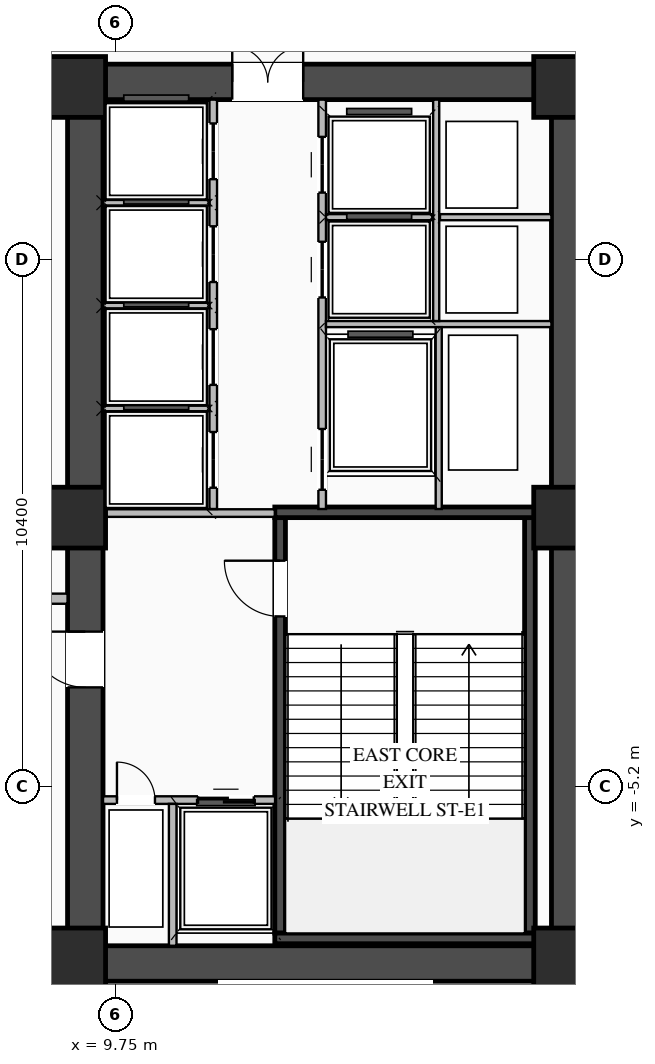
"""IFC4 building model, lengths in metres.
Left out: names, types, materials, properties, quantities, classifications, styles, units other than length and angle.
Written with IfcOpenShell. Run it as: python <this file> out.ifc"""

import sys

from ifc_helpers import new_model, si_unit, direction, frame, frame_2d, origin, origin_2d, place, context, subcontext, project, spatial, rectangle, extrude, element, fill, save


model = new_model("IFC4")
c1 = context("Model", 3, precision=1e-05, world=origin(), true_north=direction((0.0, 1.0)))
c2 = subcontext(c1, "Body", "Model", "MODEL_VIEW")
j1 = project(units=[si_unit("LENGTHUNIT", "METRE"), si_unit("PLANEANGLEUNIT", "RADIAN")], contexts=[c1])
p1 = place(None, origin())
s1 = spatial("IfcSite", under=j1, at=p1, CompositionType="ELEMENT")
p2 = place(p1, origin())
s2 = spatial("IfcBuilding", under=s1, at=p2, CompositionType="ELEMENT")
p3 = place(p2, origin())
s3 = spatial("IfcBuildingStorey", under=s2, at=p3, CompositionType="ELEMENT", Elevation=0.0)
p4 = place(p3, frame((8.8, -8.7, 0.0), z_axis=(0.0, 0.0, 1.0), x_axis=(1.0, 0.0, 0.0)))
e1 = element("IfcWall", 1, at=p4, inside=s3, PredefinedType="SHEAR", context=c2, shape_type="SweptSolid", body=[
    extrude(rectangle(XDim=10.25, YDim=0.7, at=frame_2d((5.125, 0.0))), origin(), (0.0, 0.0, 1.0), 4.85),
])
p5 = place(p3, frame((8.8, 8.7, 0.0), z_axis=(0.0, 0.0, 1.0), x_axis=(1.0, 0.0, 0.0)))
e2 = element("IfcWall", 2, at=p5, inside=s3, PredefinedType="SHEAR", context=c2, shape_type="SweptSolid", body=[
    extrude(rectangle(XDim=10.25, YDim=0.7, at=frame_2d((5.125, 0.0))), origin(), (0.0, 0.0, 1.0), 4.85),
])
p6 = place(p5, frame((3.25, 0.0, 0.0)))
e3 = element("IfcOpeningElement", 3, at=p6, cuts=e2, PredefinedType="OPENING", context=c2, shape_type="SweptSolid", body=[
    extrude(rectangle(XDim=1.4, YDim=2.05, at=frame_2d((0.7, 1.025))), frame((0.0, 0.36, 0.0), z_axis=(0.0, -1.0, 0.0), x_axis=(1.0, 0.0, 0.0)), (0.0, 0.0, 1.0), 0.72),
])
p7 = place(p3, frame((9.15, -8.35, 0.0), z_axis=(0.0, 0.0, 1.0), x_axis=(0.0, 1.0, 0.0)))
e4 = element("IfcWall", 4, at=p7, inside=s3, PredefinedType="SHEAR", context=c2, shape_type="SweptSolid", body=[
    extrude(rectangle(XDim=16.7, YDim=0.7, at=frame_2d((8.35, 0.0))), origin(), (0.0, 0.0, 1.0), 4.85),
])
p8 = place(p7, frame((5.1, 0.0, 0.0)))
e5 = element("IfcOpeningElement", 5, at=p8, cuts=e4, PredefinedType="OPENING", context=c2, shape_type="SweptSolid", body=[
    extrude(rectangle(XDim=1.1, YDim=2.08, at=frame_2d((0.55, 1.04))), frame((0.0, 0.36, 0.0), z_axis=(0.0, -1.0, 0.0), x_axis=(1.0, 0.0, 0.0)), (0.0, 0.0, 1.0), 0.72),
])
p9 = place(p3, frame((18.7, -8.35, 0.0), z_axis=(0.0, 0.0, 1.0), x_axis=(0.0, 1.0, 0.0)))
e6 = element("IfcWall", 6, at=p9, inside=s3, PredefinedType="SHEAR", context=c2, shape_type="SweptSolid", body=[
    extrude(rectangle(XDim=16.7, YDim=0.7, at=frame_2d((8.35, 0.0))), origin(), (0.0, 0.0, 1.0), 4.85),
])
p10 = place(p3, frame((12.995, -8.1, 0.0), z_axis=(0.0, 0.0, 1.0), x_axis=(0.0, 1.0, 0.0)))
e7 = element("IfcWall", 7, at=p10, inside=s3, PredefinedType="SHEAR", context=c2, shape_type="SweptSolid", body=[
    extrude(rectangle(XDim=8.2, YDim=0.21, at=frame_2d((4.1, 0.0))), origin(), (0.0, 0.0, 1.0), 4.85),
])
p11 = place(p10, frame((6.25, 0.0, 0.0)))
e8 = element("IfcOpeningElement", 8, at=p11, cuts=e7, PredefinedType="OPENING", context=c2, shape_type="SweptSolid", body=[
    extrude(rectangle(XDim=1.1, YDim=2.15, at=frame_2d((0.55, 1.075))), frame((0.0, 0.115, 0.0), z_axis=(0.0, -1.0, 0.0), x_axis=(1.0, 0.0, 0.0)), (0.0, 0.0, 1.0), 0.23),
])
p12 = place(p3, frame((17.925, -8.1, 0.0), z_axis=(0.0, 0.0, 1.0), x_axis=(0.0, 1.0, 0.0)))
e9 = element("IfcWall", 9, at=p12, inside=s3, PredefinedType="SHEAR", context=c2, shape_type="SweptSolid", body=[
    extrude(rectangle(XDim=8.2, YDim=0.21, at=frame_2d((4.1, 0.0))), origin(), (0.0, 0.0, 1.0), 4.85),
])
for number, where, z_axis, x_axis in (
    (10, (12.89, -8.205, 0.0), (0.0, 0.0, 1.0), (1.0, 0.0, 0.0)),
    (11, (18.03, 0.205, 0.0), (0.0, 0.0, 1.0), (-1.0, 0.0, 0.0)),
):
    element("IfcWall", number, at=place(p3, frame(where, z_axis=z_axis, x_axis=x_axis)), inside=s3, PredefinedType="SHEAR", context=c2, shape_type="SweptSolid", body=[
        extrude(rectangle(XDim=5.14, YDim=0.21, at=frame_2d((2.57, 0.0))), origin(), (0.0, 0.0, 1.0), 4.85),
    ])
for number, where, z_axis, x_axis in (
    (12, (8.95, -8.6, 0.0), (0.0, 0.0, 1.0), (1.0, 0.0, 0.0)),
    (13, (8.95, 0.1, 0.0), (0.0, 0.0, 1.0), (1.0, 0.0, 0.0)),
    (14, (8.95, 8.6, 0.0), (0.0, 0.0, 1.0), (1.0, 0.0, 0.0)),
    (15, (18.6, -8.6, 0.0), (0.0, 0.0, 1.0), (1.0, 0.0, 0.0)),
    (16, (18.6, 0.1, 0.0), (0.0, 0.0, 1.0), (1.0, 0.0, 0.0)),
    (17, (18.6, 8.6, 0.0), (0.0, 0.0, 1.0), (1.0, 0.0, 0.0)),
):
    element("IfcColumn", number, at=place(p3, frame(where, z_axis=z_axis, x_axis=x_axis)), inside=s3, PredefinedType="COLUMN", context=c2, shape_type="SweptSolid", body=[
        extrude(rectangle(XDim=1.2, YDim=1.2, at=origin_2d()), origin(), (0.0, 0.0, 1.0), 5.1),
    ])
p13 = place(p3, frame((9.5, -5.475, 0.0), z_axis=(0.0, 0.0, 1.0), x_axis=(1.0, 0.0, 0.0)))
e18 = element("IfcWall", 18, at=p13, inside=s3, PredefinedType="STANDARD", context=c2, shape_type="SweptSolid", body=[
    extrude(rectangle(XDim=3.395, YDim=0.15, at=frame_2d((1.698, 0.0))), origin(), (0.0, 0.0, 1.0), 4.83),
])
p14 = place(p13, frame((1.875, 0.0, 0.0)))
e19 = element("IfcOpeningElement", 19, at=p14, cuts=e18, PredefinedType="OPENING", context=c2, shape_type="SweptSolid", body=[
    extrude(rectangle(XDim=1.1, YDim=2.15, at=frame_2d((0.55, 1.075))), frame((0.0, 0.085, 0.0), z_axis=(0.0, -1.0, 0.0), x_axis=(1.0, 0.0, 0.0)), (0.0, 0.0, 1.0), 0.17),
])
p15 = place(p13, frame((0.275, 0.0, 0.0)))
e20 = element("IfcOpeningElement", 20, at=p15, cuts=e18, PredefinedType="OPENING", context=c2, shape_type="SweptSolid", body=[
    extrude(rectangle(XDim=0.75, YDim=2.05, at=frame_2d((0.375, 1.025))), frame((0.0, 0.085, 0.0), z_axis=(0.0, -1.0, 0.0), x_axis=(1.0, 0.0, 0.0)), (0.0, 0.0, 1.0), 0.17),
])
p16 = place(p3, frame((10.875, -8.35, 0.0), z_axis=(0.0, 0.0, 1.0), x_axis=(0.0, 1.0, 0.0)))
e21 = element("IfcWall", 21, at=p16, inside=s3, PredefinedType="STANDARD", context=c2, shape_type="SweptSolid", body=[
    extrude(rectangle(XDim=2.8, YDim=0.15, at=frame_2d((1.4, 0.0))), origin(), (0.0, 0.0, 1.0), 4.83),
])
p17 = place(p3, frame((9.5, 0.19, 0.0), z_axis=(0.0, 0.0, 1.0), x_axis=(1.0, 0.0, 0.0)))
e22 = element("IfcWall", 22, at=p17, inside=s3, PredefinedType="STANDARD", context=c2, shape_type="SweptSolid", body=[
    extrude(rectangle(XDim=3.39, YDim=0.15, at=frame_2d((1.695, 0.0))), origin(), (0.0, 0.0, 1.0), 4.025),
])
p18 = place(p3, frame((11.675, 0.27, 0.0), z_axis=(0.0, 0.0, 1.0), x_axis=(0.0, 1.0, 0.0)))
e23 = element("IfcWall", 23, at=p18, inside=s3, PredefinedType="STANDARD", context=c2, shape_type="SweptSolid", body=[
    extrude(rectangle(XDim=8.08, YDim=0.15, at=frame_2d((4.04, 0.0))), origin(), (0.0, 0.0, 1.0), 4.83),
])
p19 = place(p18, frame((0.42, 0.0, 0.0)))
e24 = element("IfcOpeningElement", 24, at=p19, cuts=e23, PredefinedType="OPENING", context=c2, shape_type="SweptSolid", body=[
    extrude(rectangle(XDim=1.1, YDim=2.1, at=frame_2d((0.55, 1.05))), frame((0.0, 0.085, 0.0), z_axis=(0.0, -1.0, 0.0), x_axis=(1.0, 0.0, 0.0)), (0.0, 0.0, 1.0), 0.17),
])
p20 = place(p18, frame((2.45, 0.0, 0.0)))
e25 = element("IfcOpeningElement", 25, at=p20, cuts=e23, PredefinedType="OPENING", context=c2, shape_type="SweptSolid", body=[
    extrude(rectangle(XDim=1.1, YDim=2.1, at=frame_2d((0.55, 1.05))), frame((0.0, 0.085, 0.0), z_axis=(0.0, -1.0, 0.0), x_axis=(1.0, 0.0, 0.0)), (0.0, 0.0, 1.0), 0.17),
])
p21 = place(p18, frame((4.48, 0.0, 0.0)))
e26 = element("IfcOpeningElement", 26, at=p21, cuts=e23, PredefinedType="OPENING", context=c2, shape_type="SweptSolid", body=[
    extrude(rectangle(XDim=1.1, YDim=2.1, at=frame_2d((0.55, 1.05))), frame((0.0, 0.085, 0.0), z_axis=(0.0, -1.0, 0.0), x_axis=(1.0, 0.0, 0.0)), (0.0, 0.0, 1.0), 0.17),
])
p22 = place(p18, frame((6.51, 0.0, 0.0)))
e27 = element("IfcOpeningElement", 27, at=p22, cuts=e23, PredefinedType="OPENING", context=c2, shape_type="SweptSolid", body=[
    extrude(rectangle(XDim=1.1, YDim=2.1, at=frame_2d((0.55, 1.05))), frame((0.0, 0.085, 0.0), z_axis=(0.0, -1.0, 0.0), x_axis=(1.0, 0.0, 0.0)), (0.0, 0.0, 1.0), 0.17),
])
for number, where, z_axis, x_axis in (
    (28, (9.5, 2.255, 0.0), (0.0, 0.0, 1.0), (1.0, 0.0, 0.0)),
    (29, (9.5, 4.285, 0.0), (0.0, 0.0, 1.0), (1.0, 0.0, 0.0)),
    (30, (9.5, 6.315, 0.0), (0.0, 0.0, 1.0), (1.0, 0.0, 0.0)),
):
    element("IfcWall", number, at=place(p3, frame(where, z_axis=z_axis, x_axis=x_axis)), inside=s3, PredefinedType="STANDARD", context=c2, shape_type="SweptSolid", body=[
        extrude(rectangle(XDim=2.1, YDim=0.11, at=frame_2d((1.05, 0.0))), origin(), (0.0, 0.0, 1.0), 4.83),
    ])
p23 = place(p3, frame((13.825, 0.27, 0.0), z_axis=(0.0, 0.0, 1.0), x_axis=(0.0, 1.0, 0.0)))
e31 = element("IfcWall", 31, at=p23, inside=s3, PredefinedType="STANDARD", context=c2, shape_type="SweptSolid", body=[
    extrude(rectangle(XDim=8.08, YDim=0.15, at=frame_2d((4.04, 0.0))), origin(), (0.0, 0.0, 1.0), 4.83),
])
p24 = place(p23, frame((4.175, 0.0, 0.0)))
e32 = element("IfcOpeningElement", 32, at=p24, cuts=e31, PredefinedType="OPENING", context=c2, shape_type="SweptSolid", body=[
    extrude(rectangle(XDim=1.1, YDim=2.1, at=frame_2d((0.55, 1.05))), frame((0.0, 0.085, 0.0), z_axis=(0.0, -1.0, 0.0), x_axis=(1.0, 0.0, 0.0)), (0.0, 0.0, 1.0), 0.17),
])
p25 = place(p23, frame((6.245, 0.0, 0.0)))
e33 = element("IfcOpeningElement", 33, at=p25, cuts=e31, PredefinedType="OPENING", context=c2, shape_type="SweptSolid", body=[
    extrude(rectangle(XDim=1.1, YDim=2.1, at=frame_2d((0.55, 1.05))), frame((0.0, 0.085, 0.0), z_axis=(0.0, -1.0, 0.0), x_axis=(1.0, 0.0, 0.0)), (0.0, 0.0, 1.0), 0.17),
])
p26 = place(p23, frame((0.38, 0.0, 0.0)))
e34 = element("IfcOpeningElement", 34, at=p26, cuts=e31, PredefinedType="OPENING", context=c2, shape_type="SweptSolid", body=[
    extrude(rectangle(XDim=1.2, YDim=2.1, at=frame_2d((0.6, 1.05))), frame((0.0, 0.085, 0.0), z_axis=(0.0, -1.0, 0.0), x_axis=(1.0, 0.0, 0.0)), (0.0, 0.0, 1.0), 0.17),
])
p27 = place(p3, frame((13.9, 3.92, 0.0), z_axis=(0.0, 0.0, 1.0), x_axis=(1.0, 0.0, 0.0)))
e35 = element("IfcWall", 35, at=p27, inside=s3, PredefinedType="STANDARD", context=c2, shape_type="SweptSolid", body=[
    extrude(rectangle(XDim=4.45, YDim=0.12, at=frame_2d((2.225, 0.0))), origin(), (0.0, 0.0, 1.0), 4.83),
])
p28 = place(p3, frame((16.15, 6.03, 0.0), z_axis=(0.0, 0.0, 1.0), x_axis=(1.0, 0.0, 0.0)))
e36 = element("IfcWall", 36, at=p28, inside=s3, PredefinedType="STANDARD", context=c2, shape_type="SweptSolid", body=[
    extrude(rectangle(XDim=2.2, YDim=0.12, at=frame_2d((1.1, 0.0))), origin(), (0.0, 0.0, 1.0), 4.83),
])
p29 = place(p3, frame((16.075, 3.98, 0.0), z_axis=(0.0, 0.0, 1.0), x_axis=(0.0, 1.0, 0.0)))
e37 = element("IfcWall", 37, at=p29, inside=s3, PredefinedType="STANDARD", context=c2, shape_type="SweptSolid", body=[
    extrude(rectangle(XDim=4.37, YDim=0.12, at=frame_2d((2.185, 0.0))), origin(), (0.0, 0.0, 1.0), 4.83),
])
p30 = place(p3, frame((13.9, 6.03, 0.0), z_axis=(0.0, 0.0, 1.0), x_axis=(1.0, 0.0, 0.0)))
e38 = element("IfcWall", 38, at=p30, inside=s3, PredefinedType="STANDARD", context=c2, shape_type="SweptSolid", body=[
    extrude(rectangle(XDim=2.1, YDim=0.12, at=frame_2d((1.05, 0.0))), origin(), (0.0, 0.0, 1.0), 4.83),
])
p31 = place(p3, frame((16.125, 0.27, 0.0), z_axis=(0.0, 0.0, 1.0), x_axis=(0.0, 1.0, 0.0)))
e39 = element("IfcWall", 39, at=p31, inside=s3, PredefinedType="STANDARD", context=c2, shape_type="SweptSolid", body=[
    extrude(rectangle(XDim=3.59, YDim=0.12, at=frame_2d((1.795, 0.0))), origin(), (0.0, 0.0, 1.0), 4.83),
])
p32 = place(p3, frame((8.9, -25.68, 0.0), z_axis=(0.0, 0.0, 1.0), x_axis=(0.0, 1.0, 0.0)))
e40 = element("IfcWall", 40, at=p32, inside=s3, PredefinedType="STANDARD", context=c2, shape_type="SweptSolid", body=[
    extrude(rectangle(XDim=16.63, YDim=0.2, at=frame_2d((8.315, 0.0))), origin(), (0.0, 0.0, 1.0), 4.025),
])
p33 = place(p3, frame((5.8, -1.5, 0.0), z_axis=(0.0, 0.0, 1.0), x_axis=(1.0, 0.0, 0.0)))
e41 = element("IfcWall", 41, at=p33, inside=s3, PredefinedType="STANDARD", context=c2, shape_type="SweptSolid", body=[
    extrude(rectangle(XDim=3.0, YDim=0.2, at=frame_2d((1.5, 0.0))), origin(), (0.0, 0.0, 1.0), 4.83),
])
p34 = place(p11, origin())
e42 = element("IfcDoor", 42, at=p34, inside=s3, OperationType="SINGLE_SWING_RIGHT", PredefinedType="DOOR", context=c2, shape_type="SweptSolid", body=[
    extrude(rectangle(XDim=1.1, YDim=2.15, at=frame_2d((0.55, 1.075))), frame((0.0, 0.025, 0.0), z_axis=(0.0, -1.0, 0.0), x_axis=(1.0, 0.0, 0.0)), (0.0, 0.0, 1.0), 0.05),
])
fill(e8, e42)
p35 = place(p14, origin())
e43 = element("IfcDoor", 43, at=p35, inside=s3, OperationType="DOUBLE_DOOR_SLIDING", PredefinedType="DOOR", context=c2, shape_type="SweptSolid", body=[
    extrude(rectangle(XDim=1.1, YDim=2.15, at=frame_2d((0.55, 1.075))), frame((0.0, 0.025, 0.0), z_axis=(0.0, -1.0, 0.0), x_axis=(1.0, 0.0, 0.0)), (0.0, 0.0, 1.0), 0.05),
])
fill(e19, e43)
p36 = place(p15, origin())
e44 = element("IfcDoor", 44, at=p36, inside=s3, OperationType="SINGLE_SWING_LEFT", PredefinedType="DOOR", context=c2, shape_type="SweptSolid", body=[
    extrude(rectangle(XDim=0.75, YDim=2.05, at=frame_2d((0.375, 1.025))), frame((0.0, 0.025, 0.0), z_axis=(0.0, -1.0, 0.0), x_axis=(1.0, 0.0, 0.0)), (0.0, 0.0, 1.0), 0.05),
])
fill(e20, e44)
p37 = place(p8, origin())
e45 = element("IfcDoor", 45, at=p37, inside=s3, OperationType="SINGLE_SWING_RIGHT", PredefinedType="DOOR", context=c2, shape_type="SweptSolid", body=[
    extrude(rectangle(XDim=1.1, YDim=2.08, at=frame_2d((0.55, 1.04))), frame((0.0, -0.255, 0.0), z_axis=(0.0, -1.0, 0.0), x_axis=(1.0, 0.0, 0.0)), (0.0, 0.0, 1.0), 0.05),
])
fill(e5, e45)
p38 = place(p6, origin())
e46 = element("IfcDoor", 46, at=p38, inside=s3, OperationType="DOUBLE_DOOR_SINGLE_SWING", PredefinedType="DOOR", context=c2, shape_type="SweptSolid", body=[
    extrude(rectangle(XDim=1.4, YDim=2.05, at=frame_2d((0.7, 1.025))), frame((0.0, 0.295, 0.0), z_axis=(0.0, -1.0, 0.0), x_axis=(1.0, 0.0, 0.0)), (0.0, 0.0, 1.0), 0.05),
])
fill(e3, e46)
p39 = place(p19, origin())
e47 = element("IfcDoor", 47, at=p39, inside=s3, OperationType="DOUBLE_DOOR_SLIDING", PredefinedType="DOOR", context=c2, shape_type="SweptSolid", body=[
    extrude(rectangle(XDim=1.1, YDim=2.1, at=frame_2d((0.55, 1.05))), frame((0.0, 0.025, 0.0), z_axis=(0.0, -1.0, 0.0), x_axis=(1.0, 0.0, 0.0)), (0.0, 0.0, 1.0), 0.05),
])
fill(e24, e47)
p40 = place(p20, origin())
e48 = element("IfcDoor", 48, at=p40, inside=s3, OperationType="DOUBLE_DOOR_SLIDING", PredefinedType="DOOR", context=c2, shape_type="SweptSolid", body=[
    extrude(rectangle(XDim=1.1, YDim=2.1, at=frame_2d((0.55, 1.05))), frame((0.0, 0.025, 0.0), z_axis=(0.0, -1.0, 0.0), x_axis=(1.0, 0.0, 0.0)), (0.0, 0.0, 1.0), 0.05),
])
fill(e25, e48)
p41 = place(p21, origin())
e49 = element("IfcDoor", 49, at=p41, inside=s3, OperationType="DOUBLE_DOOR_SLIDING", PredefinedType="DOOR", context=c2, shape_type="SweptSolid", body=[
    extrude(rectangle(XDim=1.1, YDim=2.1, at=frame_2d((0.55, 1.05))), frame((0.0, 0.025, 0.0), z_axis=(0.0, -1.0, 0.0), x_axis=(1.0, 0.0, 0.0)), (0.0, 0.0, 1.0), 0.05),
])
fill(e26, e49)
p42 = place(p22, origin())
e50 = element("IfcDoor", 50, at=p42, inside=s3, OperationType="DOUBLE_DOOR_SLIDING", PredefinedType="DOOR", context=c2, shape_type="SweptSolid", body=[
    extrude(rectangle(XDim=1.1, YDim=2.1, at=frame_2d((0.55, 1.05))), frame((0.0, 0.025, 0.0), z_axis=(0.0, -1.0, 0.0), x_axis=(1.0, 0.0, 0.0)), (0.0, 0.0, 1.0), 0.05),
])
fill(e27, e50)
p43 = place(p24, origin())
e51 = element("IfcDoor", 51, at=p43, inside=s3, OperationType="DOUBLE_DOOR_SLIDING", PredefinedType="DOOR", context=c2, shape_type="SweptSolid", body=[
    extrude(rectangle(XDim=1.1, YDim=2.1, at=frame_2d((0.55, 1.05))), frame((0.0, 0.025, 0.0), z_axis=(0.0, -1.0, 0.0), x_axis=(1.0, 0.0, 0.0)), (0.0, 0.0, 1.0), 0.05),
])
fill(e32, e51)
p44 = place(p25, origin())
e52 = element("IfcDoor", 52, at=p44, inside=s3, OperationType="DOUBLE_DOOR_SLIDING", PredefinedType="DOOR", context=c2, shape_type="SweptSolid", body=[
    extrude(rectangle(XDim=1.1, YDim=2.1, at=frame_2d((0.55, 1.05))), frame((0.0, 0.025, 0.0), z_axis=(0.0, -1.0, 0.0), x_axis=(1.0, 0.0, 0.0)), (0.0, 0.0, 1.0), 0.05),
])
fill(e33, e52)
p45 = place(p26, origin())
e53 = element("IfcDoor", 53, at=p45, inside=s3, OperationType="DOUBLE_DOOR_SLIDING", PredefinedType="DOOR", context=c2, shape_type="SweptSolid", body=[
    extrude(rectangle(XDim=1.2, YDim=2.1, at=frame_2d((0.6, 1.05))), frame((0.0, 0.025, 0.0), z_axis=(0.0, -1.0, 0.0), x_axis=(1.0, 0.0, 0.0)), (0.0, 0.0, 1.0), 0.05),
])
fill(e34, e53)
save(model, sys.argv[1])
